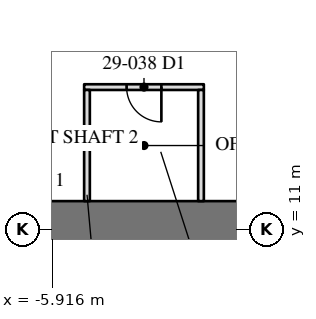
"""IFC4 building model, lengths in metres.
Left out: names, types, materials, properties, quantities, classifications, styles, units other than length and angle.
Written with IfcOpenShell. Run it as: python <this file> out.ifc"""

import sys

from ifc_helpers import new_model, si_unit, direction, frame, frame_2d, origin, place, context, subcontext, project, spatial, rectangle, extrude, element, fill, save


model = new_model("IFC4")
c1 = context("Model", 3, precision=1e-05, world=origin(), true_north=direction((0.0, 1.0)))
c2 = subcontext(c1, "Body", "Model", "MODEL_VIEW")
j1 = project(units=[si_unit("LENGTHUNIT", "METRE"), si_unit("PLANEANGLEUNIT", "RADIAN")], contexts=[c1])
p1 = place(None, origin())
s1 = spatial("IfcSite", under=j1, at=p1, CompositionType="ELEMENT")
p2 = place(p1, origin())
s2 = spatial("IfcBuilding", under=s1, at=p2, CompositionType="ELEMENT")
p3 = place(p2, frame((0.0, 0.0, 125.4)))
s3 = spatial("IfcBuildingStorey", under=s2, at=p3, CompositionType="ELEMENT", Elevation=125.4)
p4 = place(p3, frame((6.5, 11.0, 0.0), z_axis=(0.0, 0.0, 1.0), x_axis=(-1.0, 0.0, 0.0)))
e1 = element("IfcWall", 1, at=p4, inside=s3, PredefinedType="SHEAR", context=c2, shape_type="SweptSolid", body=[
    extrude(rectangle(XDim=13.0, YDim=1.5, at=frame_2d((6.5, 0.0))), origin(), (0.0, 0.0, 1.0), 4.1),
])
p5 = place(p3, frame((-1.925, 14.75, 0.0), z_axis=(0.0, 0.0, 1.0), x_axis=(-1.0, 0.0, 0.0)))
e2 = element("IfcWall", 2, at=p5, inside=s3, PredefinedType="PARTITIONING", context=c2, shape_type="SweptSolid", body=[
    extrude(rectangle(XDim=3.15, YDim=0.15, at=frame_2d((1.575, 0.0))), origin(), (0.0, 0.0, 1.0), 3.91),
])
p6 = place(p5, frame((1.117, 0.0, 0.0)))
e3 = element("IfcOpeningElement", 3, at=p6, cuts=e2, PredefinedType="OPENING", context=c2, shape_type="SweptSolid", body=[
    extrude(rectangle(XDim=0.915, YDim=2.134, at=frame_2d((0.458, 1.067))), frame((0.0, 0.085, 0.0), z_axis=(0.0, -1.0, 0.0), x_axis=(1.0, 0.0, 0.0)), (0.0, 0.0, 1.0), 0.17),
])
for number, where, z_axis, x_axis in (
    (4, (-2.0, 14.675, 0.0), (0.0, 0.0, 1.0), (0.0, -1.0, 0.0)),
    (5, (-5.0, 14.675, 0.0), (0.0, 0.0, 1.0), (0.0, -1.0, 0.0)),
):
    element("IfcWall", number, at=place(p3, frame(where, z_axis=z_axis, x_axis=x_axis)), inside=s3, PredefinedType="PARTITIONING", context=c2, shape_type="SweptSolid", body=[
        extrude(rectangle(XDim=2.925, YDim=0.15, at=frame_2d((1.462, 0.0))), origin(), (0.0, 0.0, 1.0), 3.91),
    ])
p7 = place(p6, origin())
e6 = element("IfcDoor", 6, at=p7, inside=s3, OperationType="SINGLE_SWING_LEFT", PredefinedType="DOOR", context=c2, shape_type="SweptSolid", body=[
    extrude(rectangle(XDim=0.915, YDim=2.134, at=frame_2d((0.458, 1.067))), frame((0.0, 0.025, 0.0), z_axis=(0.0, -1.0, 0.0), x_axis=(1.0, 0.0, 0.0)), (0.0, 0.0, 1.0), 0.05),
])
fill(e3, e6)
save(model, sys.argv[1])
